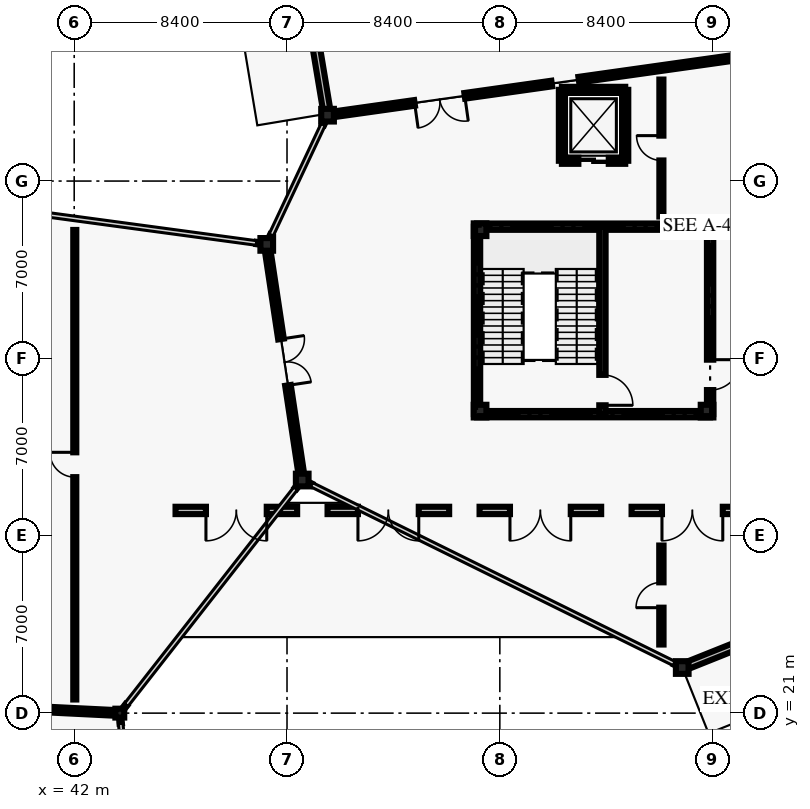
"""IFC4 building model, lengths in metres.
Left out: names, types, materials, properties, quantities, classifications, styles, units other than length and angle.
Written with IfcOpenShell. Run it as: python <this file> out.ifc"""

import sys

from ifc_helpers import new_model, si_unit, direction, frame, frame_2d, origin, origin_2d, place, context, subcontext, project, spatial, rectangle, i_section, extrude, element, fill, save


model = new_model("IFC4")
c1 = context("Model", 3, precision=1e-05, world=origin(), true_north=direction((0.0, 1.0)))
c2 = subcontext(c1, "Body", "Model", "MODEL_VIEW")
j1 = project(units=[si_unit("LENGTHUNIT", "METRE"), si_unit("PLANEANGLEUNIT", "RADIAN")], contexts=[c1])
p1 = place(None, origin())
s1 = spatial("IfcSite", under=j1, at=p1, CompositionType="ELEMENT")
p2 = place(p1, origin())
s2 = spatial("IfcBuilding", under=s1, at=p2, CompositionType="ELEMENT")
p3 = place(p2, origin())
s3 = spatial("IfcBuildingStorey", under=s2, at=p3, CompositionType="ELEMENT", Elevation=0.0)
p4 = place(p3, frame((43.8, 21.0, 0.0), z_axis=(0.0, 0.0, 1.0), x_axis=(1.0, 0.0, 0.0)))
e1 = element("IfcColumn", 1, at=p4, inside=s3, PredefinedType="COLUMN", context=c2, shape_type="SweptSolid", body=[
    extrude(i_section(OverallWidth=0.35, OverallDepth=0.35, WebThickness=0.02, FlangeThickness=0.028, at=origin_2d()), origin(), (0.0, 0.0, 1.0), 5.4),
])
for number, where, z_axis, x_axis in (
    (2, (49.6, 39.5, 0.0), (0.0, 0.0, 1.0), (1.0, 0.0, 0.0)),
    (3, (51.0, 30.2, 0.0), (0.0, 0.0, 1.0), (1.0, 0.0, 0.0)),
    (4, (52.0, 44.6, 0.0), (0.0, 0.0, 1.0), (1.0, 0.0, 0.0)),
    (5, (66.0, 22.8, 0.0), (0.0, 0.0, 1.0), (1.0, 0.0, 0.0)),
    (6, (58.02, 32.92, 0.0), (0.0, 0.0, 1.0), (1.0, 0.0, 0.0)),
    (7, (66.98, 32.92, 0.0), (0.0, 0.0, 1.0), (1.0, 0.0, 0.0)),
    (8, (66.98, 40.08, 0.0), (0.0, 0.0, 1.0), (1.0, 0.0, 0.0)),
    (9, (58.02, 40.08, 0.0), (0.0, 0.0, 1.0), (1.0, 0.0, 0.0)),
):
    element("IfcColumn", number, at=place(p3, frame(where, z_axis=z_axis, x_axis=x_axis)), inside=s3, PredefinedType="COLUMN", context=c2, shape_type="SweptSolid", body=[
        extrude(i_section(OverallWidth=0.5, OverallDepth=0.5, WebThickness=0.022, FlangeThickness=0.036, at=origin_2d()), origin(), (0.0, 0.0, 1.0), 5.4),
    ])
for number, where, z_axis, x_axis in (
    (10, (65.962, 22.819, 0.0), (0.0, 0.0, 1.0), (-0.897, 0.442, 0.0)),
    (11, (51.368, 30.018, 0.0), (0.0, 0.0, 1.0), (-0.897, 0.442, 0.0)),
):
    element("IfcWall", number, at=place(p3, frame(where, z_axis=z_axis, x_axis=x_axis)), inside=s3, PredefinedType="SOLIDWALL", context=c2, shape_type="SweptSolid", body=[
        extrude(rectangle(XDim=0.308, YDim=0.095, at=frame_2d((0.154, 0.0))), origin(), (0.0, 0.0, 1.0), 4.22),
    ])
p5 = place(p3, frame((77.444, 27.378, 0.0), z_axis=(0.0, 0.0, 1.0), x_axis=(-0.928469860605, -0.371407751599, 0.0)))
e12 = element("IfcWall", 12, at=p5, inside=s3, PredefinedType="SOLIDWALL", context=c2, shape_type="SweptSolid", body=[
    extrude(rectangle(XDim=12.326, YDim=0.29, at=frame_2d((6.163, 0.0))), origin(), (0.0, 0.0, 1.0), 4.22),
])
p6 = place(p5, frame((4.863, 0.0, 0.0)))
e13 = element("IfcOpeningElement", 13, at=p6, cuts=e12, PredefinedType="OPENING", context=c2, shape_type="SweptSolid", body=[
    extrude(rectangle(XDim=2.6, YDim=2.55, at=frame_2d((1.3, 1.275))), frame((0.0, 0.155, 0.0), z_axis=(0.0, -1.0, 0.0), x_axis=(1.0, 0.0, 0.0)), (0.0, 0.0, 1.0), 0.31),
])
p7 = place(p3, frame((49.644, 39.592, 0.0), z_axis=(0.0, 0.0, 1.0), x_axis=(0.42457593243, 0.905392333522, 0.0)))
e14 = element("IfcWall", 14, at=p7, inside=s3, PredefinedType="SOLIDWALL", context=c2, shape_type="SweptSolid", body=[
    extrude(rectangle(XDim=0.308, YDim=0.095, at=frame_2d((0.154, 0.0))), origin(), (0.0, 0.0, 1.0), 4.22),
])
p8 = place(p3, frame((51.825, 44.229, 0.0), z_axis=(0.0, 0.0, 1.0), x_axis=(0.425224932958, 0.905087706463, 0.0)))
e15 = element("IfcWall", 15, at=p8, inside=s3, PredefinedType="SOLIDWALL", context=c2, shape_type="SweptSolid", body=[
    extrude(rectangle(XDim=0.308, YDim=0.095, at=frame_2d((0.154, 0.0))), origin(), (0.0, 0.0, 1.0), 4.22),
])
p9 = place(p3, frame((51.99, 44.659, 0.0), z_axis=(0.0, 0.0, 1.0), x_axis=(-0.16436940764, 0.986398853321, 0.0)))
e16 = element("IfcWall", 16, at=p9, inside=s3, PredefinedType="SOLIDWALL", context=c2, shape_type="SweptSolid", body=[
    extrude(rectangle(XDim=12.046, YDim=0.29, at=frame_2d((6.023, 0.0))), origin(), (0.0, 0.0, 1.0), 4.22),
])
p10 = place(p9, frame((4.748, 0.0, 0.0)))
e17 = element("IfcOpeningElement", 17, at=p10, cuts=e16, PredefinedType="OPENING", context=c2, shape_type="SweptSolid", body=[
    extrude(rectangle(XDim=2.55, YDim=2.5, at=frame_2d((1.275, 1.25))), frame((0.0, 0.155, 0.0), z_axis=(0.0, -1.0, 0.0), x_axis=(1.0, 0.0, 0.0)), (0.0, 0.0, 1.0), 0.31),
])
p11 = place(p3, frame((43.809, 20.898, 0.0), z_axis=(0.0, 0.0, 1.0), x_axis=(0.087176781459, -0.996192857219, 0.0)))
e18 = element("IfcWall", 18, at=p11, inside=s3, PredefinedType="SOLIDWALL", context=c2, shape_type="SweptSolid", body=[
    extrude(rectangle(XDim=0.308, YDim=0.095, at=frame_2d((0.154, 0.0))), origin(), (0.0, 0.0, 1.0), 4.22),
])
p12 = place(p3, frame((50.937, 30.12, 0.0), z_axis=(0.0, 0.0, 1.0), x_axis=(-0.615582622046, -0.788072354188, 0.0)))
e19 = element("IfcWall", 19, at=p12, inside=s3, PredefinedType="SOLIDWALL", context=c2, shape_type="SweptSolid", body=[
    extrude(rectangle(XDim=0.309, YDim=0.095, at=frame_2d((0.154, 0.0))), origin(), (0.0, 0.0, 1.0), 4.22),
])
p13 = place(p3, frame((44.053, 21.323, 0.0), z_axis=(0.0, 0.0, 1.0), x_axis=(-0.615966636313, -0.787772240529, 0.0)))
e20 = element("IfcWall", 20, at=p13, inside=s3, PredefinedType="SOLIDWALL", context=c2, shape_type="SweptSolid", body=[
    extrude(rectangle(XDim=0.308, YDim=0.095, at=frame_2d((0.154, 0.0))), origin(), (0.0, 0.0, 1.0), 4.22),
])
p14 = place(p3, frame((49.194, 39.555, 0.0), z_axis=(0.0, 0.0, 1.0), x_axis=(0.991074779294, -0.133307096014, 0.0)))
e21 = element("IfcWall", 21, at=p14, inside=s3, PredefinedType="SOLIDWALL", context=c2, shape_type="SweptSolid", body=[
    extrude(rectangle(XDim=0.308, YDim=0.095, at=frame_2d((0.154, 0.0))), origin(), (0.0, 0.0, 1.0), 4.22),
])
p15 = place(p3, frame((50.8, 29.0, 0.0), z_axis=(0.0, 0.0, 1.0), x_axis=(-1.0, 0.0, 0.0)))
e22 = element("IfcWall", 22, at=p15, inside=s3, PredefinedType="SOLIDWALL", context=c2, shape_type="SweptSolid", body=[
    extrude(rectangle(XDim=4.8, YDim=0.29, at=frame_2d((2.4, 0.0))), origin(), (0.0, 0.0, 1.0), 4.4),
])
p16 = place(p15, frame((1.2, 0.0, 0.0)))
e23 = element("IfcOpeningElement", 23, at=p16, cuts=e22, PredefinedType="OPENING", context=c2, shape_type="SweptSolid", body=[
    extrude(rectangle(XDim=2.4, YDim=2.55, at=frame_2d((1.2, 1.275))), frame((0.0, 0.155, 0.0), z_axis=(0.0, -1.0, 0.0), x_axis=(1.0, 0.0, 0.0)), (0.0, 0.0, 1.0), 0.31),
])
p17 = place(p3, frame((56.8, 29.0, 0.0), z_axis=(0.0, 0.0, 1.0), x_axis=(-1.0, 0.0, 0.0)))
e24 = element("IfcWall", 24, at=p17, inside=s3, PredefinedType="SOLIDWALL", context=c2, shape_type="SweptSolid", body=[
    extrude(rectangle(XDim=4.8, YDim=0.29, at=frame_2d((2.4, 0.0))), origin(), (0.0, 0.0, 1.0), 4.4),
])
p18 = place(p17, frame((1.2, 0.0, 0.0)))
e25 = element("IfcOpeningElement", 25, at=p18, cuts=e24, PredefinedType="OPENING", context=c2, shape_type="SweptSolid", body=[
    extrude(rectangle(XDim=2.4, YDim=2.55, at=frame_2d((1.2, 1.275))), frame((0.0, 0.155, 0.0), z_axis=(0.0, -1.0, 0.0), x_axis=(1.0, 0.0, 0.0)), (0.0, 0.0, 1.0), 0.31),
])
p19 = place(p3, frame((62.8, 29.0, 0.0), z_axis=(0.0, 0.0, 1.0), x_axis=(-1.0, 0.0, 0.0)))
e26 = element("IfcWall", 26, at=p19, inside=s3, PredefinedType="SOLIDWALL", context=c2, shape_type="SweptSolid", body=[
    extrude(rectangle(XDim=4.8, YDim=0.29, at=frame_2d((2.4, 0.0))), origin(), (0.0, 0.0, 1.0), 4.4),
])
p20 = place(p19, frame((1.2, 0.0, 0.0)))
e27 = element("IfcOpeningElement", 27, at=p20, cuts=e26, PredefinedType="OPENING", context=c2, shape_type="SweptSolid", body=[
    extrude(rectangle(XDim=2.4, YDim=2.55, at=frame_2d((1.2, 1.275))), frame((0.0, 0.155, 0.0), z_axis=(0.0, -1.0, 0.0), x_axis=(1.0, 0.0, 0.0)), (0.0, 0.0, 1.0), 0.31),
])
p21 = place(p3, frame((68.8, 29.0, 0.0), z_axis=(0.0, 0.0, 1.0), x_axis=(-1.0, 0.0, 0.0)))
e28 = element("IfcWall", 28, at=p21, inside=s3, PredefinedType="SOLIDWALL", context=c2, shape_type="SweptSolid", body=[
    extrude(rectangle(XDim=4.8, YDim=0.29, at=frame_2d((2.4, 0.0))), origin(), (0.0, 0.0, 1.0), 4.4),
])
p22 = place(p21, frame((1.2, 0.0, 0.0)))
e29 = element("IfcOpeningElement", 29, at=p22, cuts=e28, PredefinedType="OPENING", context=c2, shape_type="SweptSolid", body=[
    extrude(rectangle(XDim=2.4, YDim=2.55, at=frame_2d((1.2, 1.275))), frame((0.0, 0.155, 0.0), z_axis=(0.0, -1.0, 0.0), x_axis=(1.0, 0.0, 0.0)), (0.0, 0.0, 1.0), 0.31),
])
p23 = place(p3, frame((77.5, 48.2, 0.0), z_axis=(0.0, 0.0, 1.0), x_axis=(-0.990181159322, -0.139790098807, 0.0)))
e30 = element("IfcWall", 30, at=p23, inside=s3, PredefinedType="SOLIDWALL", context=c2, shape_type="SweptSolid", body=[
    extrude(rectangle(XDim=15.738, YDim=0.225, at=frame_2d((7.869, 0.0))), origin(), (0.0, 0.0, 1.0), 4.62),
])
p24 = place(p23, frame((6.769, 0.0, 0.0)))
e31 = element("IfcOpeningElement", 31, at=p24, cuts=e30, PredefinedType="OPENING", context=c2, shape_type="SweptSolid", body=[
    extrude(rectangle(XDim=2.2, YDim=2.6, at=frame_2d((1.1, 1.3))), frame((0.0, 0.123, 0.0), z_axis=(0.0, -1.0, 0.0), x_axis=(1.0, 0.0, 0.0)), (0.0, 0.0, 1.0), 0.245),
])
p25 = place(p3, frame((60.85, 45.849, 0.0), z_axis=(0.0, 0.0, 1.0), x_axis=(-0.990187360524, -0.139746166523, 0.0)))
e32 = element("IfcWall", 32, at=p25, inside=s3, PredefinedType="SOLIDWALL", context=c2, shape_type="SweptSolid", body=[
    extrude(rectangle(XDim=8.938, YDim=0.225, at=frame_2d((4.469, 0.0))), origin(), (0.0, 0.0, 1.0), 4.62),
])
p26 = place(p25, frame((3.469, 0.0, 0.0)))
e33 = element("IfcOpeningElement", 33, at=p26, cuts=e32, PredefinedType="OPENING", context=c2, shape_type="SweptSolid", body=[
    extrude(rectangle(XDim=2.0, YDim=2.5, at=frame_2d((1.0, 1.25))), frame((0.0, 0.123, 0.0), z_axis=(0.0, -1.0, 0.0), x_axis=(1.0, 0.0, 0.0)), (0.0, 0.0, 1.0), 0.245),
])
p27 = place(p3, frame((49.6, 39.5, 0.0), z_axis=(0.0, 0.0, 1.0), x_axis=(0.148849460064, -0.988859867847, 0.0)))
e34 = element("IfcWall", 34, at=p27, inside=s3, PredefinedType="SOLIDWALL", context=c2, shape_type="SweptSolid", body=[
    extrude(rectangle(XDim=9.405, YDim=0.225, at=frame_2d((4.702, 0.0))), origin(), (0.0, 0.0, 1.0), 4.62),
])
p28 = place(p27, frame((3.777, 0.0, 0.0)))
e35 = element("IfcOpeningElement", 35, at=p28, cuts=e34, PredefinedType="OPENING", context=c2, shape_type="SweptSolid", body=[
    extrude(rectangle(XDim=1.85, YDim=2.4, at=frame_2d((0.925, 1.2))), frame((0.0, 0.123, 0.0), z_axis=(0.0, -1.0, 0.0), x_axis=(1.0, 0.0, 0.0)), (0.0, 0.0, 1.0), 0.245),
])
p29 = place(p3, frame((43.8, 21.0, 0.0), z_axis=(0.0, 0.0, 1.0), x_axis=(-0.998788882418, 0.049201304434, 0.0)))
e36 = element("IfcWall", 36, at=p29, inside=s3, PredefinedType="SOLIDWALL", context=c2, shape_type="SweptSolid", body=[
    extrude(rectangle(XDim=20.325, YDim=0.225, at=frame_2d((10.162, 0.0))), origin(), (0.0, 0.0, 1.0), 4.62),
])
p30 = place(p29, frame((9.212, 0.0, 0.0)))
e37 = element("IfcOpeningElement", 37, at=p30, cuts=e36, PredefinedType="OPENING", context=c2, shape_type="SweptSolid", body=[
    extrude(rectangle(XDim=1.9, YDim=2.35, at=frame_2d((0.95, 1.175))), frame((0.0, 0.123, 0.0), z_axis=(0.0, -1.0, 0.0), x_axis=(1.0, 0.0, 0.0)), (0.0, 0.0, 1.0), 0.245),
])
p31 = place(p3, frame((65.177, 23.708, 0.0), z_axis=(0.0, 0.0, 1.0), x_axis=(0.0, 1.0, 0.0)))
e38 = element("IfcWall", 38, at=p31, inside=s3, PredefinedType="PARTITIONING", context=c2, shape_type="SweptSolid", body=[
    extrude(rectangle(XDim=3.907, YDim=0.17, at=frame_2d((1.954, 0.0))), origin(), (0.0, 0.0, 1.0), 3.92),
])
p32 = place(p31, frame((1.454, 0.0, 0.0)))
e39 = element("IfcOpeningElement", 39, at=p32, cuts=e38, PredefinedType="OPENING", context=c2, shape_type="SweptSolid", body=[
    extrude(rectangle(XDim=1.0, YDim=2.15, at=frame_2d((0.5, 1.075))), frame((0.0, 0.095, 0.0), z_axis=(0.0, -1.0, 0.0), x_axis=(1.0, 0.0, 0.0)), (0.0, 0.0, 1.0), 0.19),
])
p33 = place(p3, frame((65.177, 40.6, 0.0), z_axis=(0.0, 0.0, 1.0), x_axis=(0.0, 1.0, 0.0)))
e40 = element("IfcWall", 40, at=p33, inside=s3, PredefinedType="PARTITIONING", context=c2, shape_type="SweptSolid", body=[
    extrude(rectangle(XDim=5.406, YDim=0.16, at=frame_2d((2.703, 0.0))), origin(), (0.0, 0.0, 1.0), 3.92),
])
p34 = place(p33, frame((2.213, 0.0, 0.0)))
e41 = element("IfcOpeningElement", 41, at=p34, cuts=e40, PredefinedType="OPENING", context=c2, shape_type="SweptSolid", body=[
    extrude(rectangle(XDim=0.98, YDim=2.15, at=frame_2d((0.49, 1.075))), frame((0.0, 0.09, 0.0), z_axis=(0.0, -1.0, 0.0), x_axis=(1.0, 0.0, 0.0)), (0.0, 0.0, 1.0), 0.18),
])
p35 = place(p3, frame((42.023, 21.538, 0.0), z_axis=(0.0, 0.0, 1.0), x_axis=(0.0, 1.0, 0.0)))
e42 = element("IfcWall", 42, at=p35, inside=s3, PredefinedType="PARTITIONING", context=c2, shape_type="SweptSolid", body=[
    extrude(rectangle(XDim=18.532, YDim=0.12, at=frame_2d((9.266, 0.0))), origin(), (0.0, 0.0, 1.0), 3.92),
])
p36 = place(p35, frame((8.776, 0.0, 0.0)))
e43 = element("IfcOpeningElement", 43, at=p36, cuts=e42, PredefinedType="OPENING", context=c2, shape_type="SweptSolid", body=[
    extrude(rectangle(XDim=0.98, YDim=2.15, at=frame_2d((0.49, 1.075))), frame((0.0, 0.07, 0.0), z_axis=(0.0, -1.0, 0.0), x_axis=(1.0, 0.0, 0.0)), (0.0, 0.0, 1.0), 0.14),
])
p37 = place(p3, frame((57.9, 32.8, 0.0), z_axis=(0.0, 0.0, 1.0), x_axis=(0.0, 1.0, 0.0)))
e44 = element("IfcWall", 44, at=p37, inside=s3, PredefinedType="SHEAR", context=c2, shape_type="SweptSolid", body=[
    extrude(rectangle(XDim=7.4, YDim=0.25, at=frame_2d((3.7, 0.0))), origin(), (0.0, 0.0, 1.0), 5.16),
])
for number, where, z_axis, x_axis in (
    (45, (57.9, 40.2, 0.0), (0.0, 0.0, 1.0), (1.0, 0.0, 0.0)),
    (46, (67.1, 32.8, 0.0), (0.0, 0.0, 1.0), (-1.0, 0.0, 0.0)),
):
    element("IfcWall", number, at=place(p3, frame(where, z_axis=z_axis, x_axis=x_axis)), inside=s3, PredefinedType="SHEAR", context=c2, shape_type="SweptSolid", body=[
        extrude(rectangle(XDim=9.2, YDim=0.25, at=frame_2d((4.6, 0.0))), origin(), (0.0, 0.0, 1.0), 5.16),
    ])
p38 = place(p3, frame((67.1, 40.2, 0.0), z_axis=(0.0, 0.0, 1.0), x_axis=(0.0, -1.0, 0.0)))
e47 = element("IfcWall", 47, at=p38, inside=s3, PredefinedType="SHEAR", context=c2, shape_type="SweptSolid", body=[
    extrude(rectangle(XDim=7.4, YDim=0.25, at=frame_2d((3.7, 0.0))), origin(), (0.0, 0.0, 1.0), 5.16),
])
p39 = place(p38, frame((5.25, 0.0, 0.0)))
e48 = element("IfcOpeningElement", 48, at=p39, cuts=e47, PredefinedType="OPENING", context=c2, shape_type="SweptSolid", body=[
    extrude(rectangle(XDim=1.2, YDim=2.2, at=frame_2d((0.6, 1.1))), frame((0.0, 0.135, 0.0), z_axis=(0.0, -1.0, 0.0), x_axis=(1.0, 0.0, 0.0)), (0.0, 0.0, 1.0), 0.27),
])
p40 = place(p3, frame((62.85, 40.2, 0.0), z_axis=(0.0, 0.0, 1.0), x_axis=(0.0, -1.0, 0.0)))
e49 = element("IfcWall", 49, at=p40, inside=s3, PredefinedType="SHEAR", context=c2, shape_type="SweptSolid", body=[
    extrude(rectangle(XDim=7.4, YDim=0.25, at=frame_2d((3.7, 0.0))), origin(), (0.0, 0.0, 1.0), 5.16),
])
p41 = place(p40, frame((5.85, 0.0, 0.0)))
e50 = element("IfcOpeningElement", 50, at=p41, cuts=e49, PredefinedType="OPENING", context=c2, shape_type="SweptSolid", body=[
    extrude(rectangle(XDim=1.2, YDim=2.2, at=frame_2d((0.6, 1.1))), frame((0.0, 0.135, 0.0), z_axis=(0.0, -1.0, 0.0), x_axis=(1.0, 0.0, 0.0)), (0.0, 0.0, 1.0), 0.27),
])
p42 = place(p3, frame((61.25, 45.6, 0.0), z_axis=(0.0, 0.0, 1.0), x_axis=(1.0, 0.0, 0.0)))
e51 = element("IfcWall", 51, at=p42, inside=s3, PredefinedType="SHEAR", context=c2, shape_type="SweptSolid", body=[
    extrude(rectangle(XDim=2.5, YDim=0.24, at=frame_2d((1.25, 0.0))), origin(), (0.0, 0.0, 1.0), 5.16),
])
for number, where, z_axis, x_axis in (
    (52, (63.75, 45.6, 0.0), (0.0, 0.0, 1.0), (0.0, -1.0, 0.0)),
    (53, (61.25, 42.8, 0.0), (0.0, 0.0, 1.0), (0.0, 1.0, 0.0)),
):
    element("IfcWall", number, at=place(p3, frame(where, z_axis=z_axis, x_axis=x_axis)), inside=s3, PredefinedType="SHEAR", context=c2, shape_type="SweptSolid", body=[
        extrude(rectangle(XDim=2.8, YDim=0.24, at=frame_2d((1.4, 0.0))), origin(), (0.0, 0.0, 1.0), 5.16),
    ])
p43 = place(p3, frame((63.75, 42.8, 0.0), z_axis=(0.0, 0.0, 1.0), x_axis=(-1.0, 0.0, 0.0)))
e54 = element("IfcWall", 54, at=p43, inside=s3, PredefinedType="SHEAR", context=c2, shape_type="SweptSolid", body=[
    extrude(rectangle(XDim=2.5, YDim=0.24, at=frame_2d((1.25, 0.0))), origin(), (0.0, 0.0, 1.0), 5.16),
])
p44 = place(p43, frame((0.65, 0.0, 0.0)))
e55 = element("IfcOpeningElement", 55, at=p44, cuts=e54, PredefinedType="OPENING", context=c2, shape_type="SweptSolid", body=[
    extrude(rectangle(XDim=1.2, YDim=2.2, at=frame_2d((0.6, 1.1))), frame((0.0, 0.13, 0.0), z_axis=(0.0, -1.0, 0.0), x_axis=(1.0, 0.0, 0.0)), (0.0, 0.0, 1.0), 0.26),
])
p45 = place(p16, origin())
e56 = element("IfcDoor", 56, at=p45, inside=s3, OperationType="DOUBLE_DOOR_SINGLE_SWING", PredefinedType="DOOR", context=c2, shape_type="SweptSolid", body=[
    extrude(rectangle(XDim=2.4, YDim=2.55, at=frame_2d((1.2, 1.275))), frame((0.0, 0.025, 0.0), z_axis=(0.0, -1.0, 0.0), x_axis=(1.0, 0.0, 0.0)), (0.0, 0.0, 1.0), 0.05),
])
fill(e23, e56)
p46 = place(p18, origin())
e57 = element("IfcDoor", 57, at=p46, inside=s3, OperationType="DOUBLE_DOOR_SINGLE_SWING", PredefinedType="DOOR", context=c2, shape_type="SweptSolid", body=[
    extrude(rectangle(XDim=2.4, YDim=2.55, at=frame_2d((1.2, 1.275))), frame((0.0, 0.025, 0.0), z_axis=(0.0, -1.0, 0.0), x_axis=(1.0, 0.0, 0.0)), (0.0, 0.0, 1.0), 0.05),
])
fill(e25, e57)
p47 = place(p20, origin())
e58 = element("IfcDoor", 58, at=p47, inside=s3, OperationType="DOUBLE_DOOR_SINGLE_SWING", PredefinedType="DOOR", context=c2, shape_type="SweptSolid", body=[
    extrude(rectangle(XDim=2.4, YDim=2.55, at=frame_2d((1.2, 1.275))), frame((0.0, 0.025, 0.0), z_axis=(0.0, -1.0, 0.0), x_axis=(1.0, 0.0, 0.0)), (0.0, 0.0, 1.0), 0.05),
])
fill(e27, e58)
p48 = place(p22, origin())
e59 = element("IfcDoor", 59, at=p48, inside=s3, OperationType="DOUBLE_DOOR_SINGLE_SWING", PredefinedType="DOOR", context=c2, shape_type="SweptSolid", body=[
    extrude(rectangle(XDim=2.4, YDim=2.55, at=frame_2d((1.2, 1.275))), frame((0.0, 0.025, 0.0), z_axis=(0.0, -1.0, 0.0), x_axis=(1.0, 0.0, 0.0)), (0.0, 0.0, 1.0), 0.05),
])
fill(e29, e59)
p49 = place(p26, origin())
e60 = element("IfcDoor", 60, at=p49, inside=s3, OperationType="DOUBLE_DOOR_SINGLE_SWING", PredefinedType="DOOR", context=c2, shape_type="SweptSolid", body=[
    extrude(rectangle(XDim=2.0, YDim=2.5, at=frame_2d((1.0, 1.25))), frame((0.0, 0.025, 0.0), z_axis=(0.0, -1.0, 0.0), x_axis=(1.0, 0.0, 0.0)), (0.0, 0.0, 1.0), 0.05),
])
fill(e33, e60)
p50 = place(p28, origin())
e61 = element("IfcDoor", 61, at=p50, inside=s3, OperationType="DOUBLE_DOOR_SINGLE_SWING", PredefinedType="DOOR", context=c2, shape_type="SweptSolid", body=[
    extrude(rectangle(XDim=1.85, YDim=2.4, at=frame_2d((0.925, 1.2))), frame((0.0, 0.025, 0.0), z_axis=(0.0, -1.0, 0.0), x_axis=(1.0, 0.0, 0.0)), (0.0, 0.0, 1.0), 0.05),
])
fill(e35, e61)
p51 = place(p32, origin())
e62 = element("IfcDoor", 62, at=p51, inside=s3, OperationType="SINGLE_SWING_LEFT", PredefinedType="DOOR", context=c2, shape_type="SweptSolid", body=[
    extrude(rectangle(XDim=1.0, YDim=2.15, at=frame_2d((0.5, 1.075))), frame((0.0, 0.025, 0.0), z_axis=(0.0, -1.0, 0.0), x_axis=(1.0, 0.0, 0.0)), (0.0, 0.0, 1.0), 0.05),
])
fill(e39, e62)
p52 = place(p34, origin())
e63 = element("IfcDoor", 63, at=p52, inside=s3, OperationType="SINGLE_SWING_RIGHT", PredefinedType="DOOR", context=c2, shape_type="SweptSolid", body=[
    extrude(rectangle(XDim=0.98, YDim=2.15, at=frame_2d((0.49, 1.075))), frame((0.0, 0.025, 0.0), z_axis=(0.0, -1.0, 0.0), x_axis=(1.0, 0.0, 0.0)), (0.0, 0.0, 1.0), 0.05),
])
fill(e41, e63)
p53 = place(p36, origin())
e64 = element("IfcDoor", 64, at=p53, inside=s3, OperationType="SINGLE_SWING_RIGHT", PredefinedType="DOOR", context=c2, shape_type="SweptSolid", body=[
    extrude(rectangle(XDim=0.98, YDim=2.15, at=frame_2d((0.49, 1.075))), frame((0.0, 0.025, 0.0), z_axis=(0.0, -1.0, 0.0), x_axis=(1.0, 0.0, 0.0)), (0.0, 0.0, 1.0), 0.05),
])
fill(e43, e64)
p54 = place(p39, origin())
e65 = element("IfcDoor", 65, at=p54, inside=s3, OperationType="SINGLE_SWING_LEFT", PredefinedType="DOOR", context=c2, shape_type="SweptSolid", body=[
    extrude(rectangle(XDim=1.2, YDim=2.2, at=frame_2d((0.6, 1.1))), frame((0.0, 0.025, 0.0), z_axis=(0.0, -1.0, 0.0), x_axis=(1.0, 0.0, 0.0)), (0.0, 0.0, 1.0), 0.05),
])
fill(e48, e65)
p55 = place(p41, origin())
e66 = element("IfcDoor", 66, at=p55, inside=s3, OperationType="SINGLE_SWING_RIGHT", PredefinedType="DOOR", context=c2, shape_type="SweptSolid", body=[
    extrude(rectangle(XDim=1.2, YDim=2.2, at=frame_2d((0.6, 1.1))), frame((0.0, 0.025, 0.0), z_axis=(0.0, -1.0, 0.0), x_axis=(1.0, 0.0, 0.0)), (0.0, 0.0, 1.0), 0.05),
])
fill(e50, e66)
p56 = place(p44, origin())
e67 = element("IfcDoor", 67, at=p56, inside=s3, OperationType="SLIDING_TO_LEFT", PredefinedType="DOOR", context=c2, shape_type="SweptSolid", body=[
    extrude(rectangle(XDim=1.2, YDim=2.2, at=frame_2d((0.6, 1.1))), frame((0.0, 0.025, 0.0), z_axis=(0.0, -1.0, 0.0), x_axis=(1.0, 0.0, 0.0)), (0.0, 0.0, 1.0), 0.05),
])
fill(e55, e67)
save(model, sys.argv[1])
